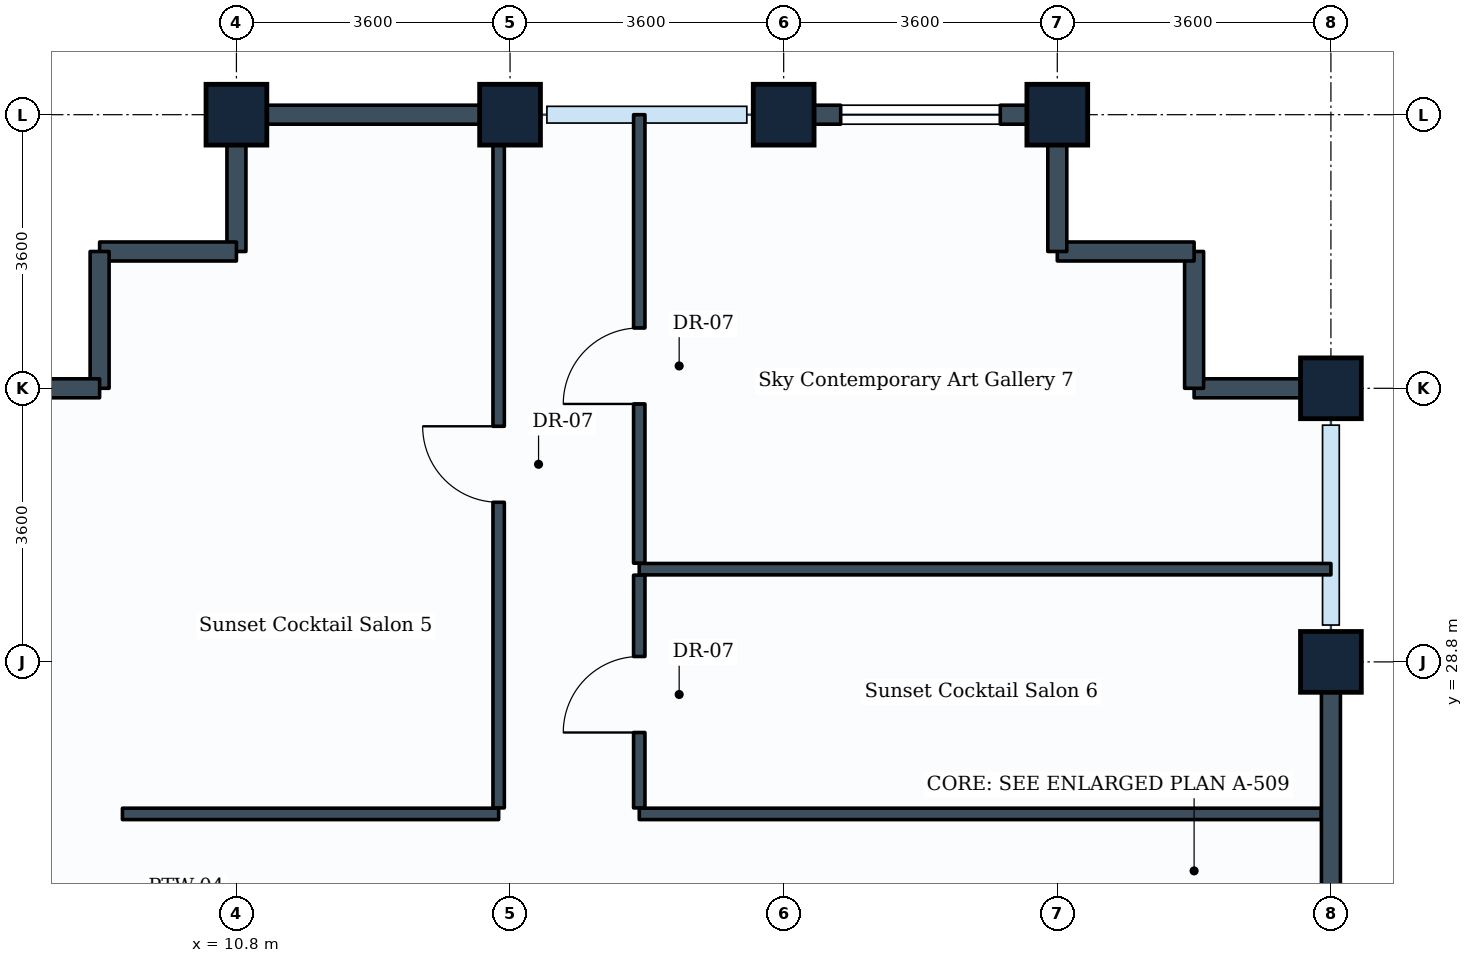
"""IFC4 building model, lengths in metres.
Left out: names, types, materials, properties, quantities, classifications, styles, units other than length and angle.
Written with IfcOpenShell. Run it as: python <this file> out.ifc"""

import sys

from ifc_helpers import new_model, si_unit, direction, frame, frame_2d, origin, origin_2d, place, context, subcontext, project, spatial, rectangle, extrude, element, fill, save


model = new_model("IFC4")
c1 = context("Model", 3, precision=1e-05, world=origin(), true_north=direction((0.0, 1.0)))
c2 = subcontext(c1, "Body", "Model", "MODEL_VIEW")
j1 = project(units=[si_unit("LENGTHUNIT", "METRE"), si_unit("PLANEANGLEUNIT", "RADIAN")], contexts=[c1])
p1 = place(None, origin())
s1 = spatial("IfcSite", under=j1, at=p1, CompositionType="ELEMENT")
p2 = place(p1, origin())
s2 = spatial("IfcBuilding", under=s1, at=p2, CompositionType="ELEMENT")
p3 = place(p2, frame((0.0, 0.0, 291.8)))
s3 = spatial("IfcBuildingStorey", under=s2, at=p3, CompositionType="ELEMENT", Elevation=291.8)
for number, where, z_axis, x_axis in (
    (1, (10.8, 36.0, 0.0), (0.0, 0.0, 1.0), (1.0, 0.0, 0.0)),
    (2, (14.4, 36.0, 0.0), (0.0, 0.0, 1.0), (1.0, 0.0, 0.0)),
    (3, (18.0, 36.0, 0.0), (0.0, 0.0, 1.0), (1.0, 0.0, 0.0)),
    (4, (21.6, 36.0, 0.0), (0.0, 0.0, 1.0), (1.0, 0.0, 0.0)),
    (5, (25.2, 28.8, 0.0), (0.0, 0.0, 1.0), (0.0, 1.0, 0.0)),
    (6, (25.2, 32.4, 0.0), (0.0, 0.0, 1.0), (0.0, 1.0, 0.0)),
):
    element("IfcColumn", number, at=place(p3, frame(where, z_axis=z_axis, x_axis=x_axis)), inside=s3, PredefinedType="COLUMN", context=c2, shape_type="SweptSolid", body=[
        extrude(rectangle(XDim=0.8, YDim=0.8, at=origin_2d()), origin(), (0.0, 0.0, 1.0), 3.6),
    ])
p4 = place(p3, frame((25.2, 28.8, 0.0), z_axis=(0.0, 0.0, 1.0), x_axis=(0.0, -1.0, 0.0)))
e7 = element("IfcWall", 7, at=p4, inside=s3, PredefinedType="STANDARD", context=c2, shape_type="SweptSolid", body=[
    extrude(rectangle(XDim=3.6, YDim=0.25, at=frame_2d((1.8, 0.0))), origin(), (0.0, 0.0, 1.0), 2.83),
])
p5 = place(p3, frame((23.4, 32.4, 0.0), z_axis=(0.0, 0.0, 1.0), x_axis=(1.0, 0.0, 0.0)))
e8 = element("IfcWall", 8, at=p5, inside=s3, PredefinedType="STANDARD", context=c2, shape_type="SweptSolid", body=[
    extrude(rectangle(XDim=1.8, YDim=0.25, at=frame_2d((0.9, 0.0))), origin(), (0.0, 0.0, 1.0), 2.83),
])
p6 = place(p3, frame((23.4, 32.4, 0.0), z_axis=(0.0, 0.0, 1.0), x_axis=(0.0, 1.0, 0.0)))
e9 = element("IfcWall", 9, at=p6, inside=s3, PredefinedType="STANDARD", context=c2, shape_type="SweptSolid", body=[
    extrude(rectangle(XDim=1.8, YDim=0.25, at=frame_2d((0.9, 0.0))), origin(), (0.0, 0.0, 1.0), 3.335),
])
p7 = place(p3, frame((21.6, 34.2, 0.0), z_axis=(0.0, 0.0, 1.0), x_axis=(1.0, 0.0, 0.0)))
e10 = element("IfcWall", 10, at=p7, inside=s3, PredefinedType="STANDARD", context=c2, shape_type="SweptSolid", body=[
    extrude(rectangle(XDim=1.8, YDim=0.25, at=frame_2d((0.9, 0.0))), origin(), (0.0, 0.0, 1.0), 3.335),
])
p8 = place(p3, frame((21.6, 34.2, 0.0), z_axis=(0.0, 0.0, 1.0), x_axis=(0.0, 1.0, 0.0)))
e11 = element("IfcWall", 11, at=p8, inside=s3, PredefinedType="STANDARD", context=c2, shape_type="SweptSolid", body=[
    extrude(rectangle(XDim=1.8, YDim=0.25, at=frame_2d((0.9, 0.0))), origin(), (0.0, 0.0, 1.0), 2.83),
])
p9 = place(p3, frame((18.0, 36.0, 0.0), z_axis=(0.0, 0.0, 1.0), x_axis=(1.0, 0.0, 0.0)))
e12 = element("IfcWall", 12, at=p9, inside=s3, PredefinedType="STANDARD", context=c2, shape_type="SweptSolid", body=[
    extrude(rectangle(XDim=3.6, YDim=0.25, at=frame_2d((1.8, 0.0))), origin(), (0.0, 0.0, 1.0), 2.83),
])
p10 = place(p9, frame((0.75, 0.0, 0.85)))
e13 = element("IfcOpeningElement", 13, at=p10, cuts=e12, PredefinedType="OPENING", context=c2, shape_type="SweptSolid", body=[
    extrude(rectangle(XDim=2.1, YDim=1.35, at=frame_2d((1.05, 0.675))), frame((0.0, 0.135, 0.0), z_axis=(0.0, -1.0, 0.0), x_axis=(1.0, 0.0, 0.0)), (0.0, 0.0, 1.0), 0.27),
])
p11 = place(p3, frame((10.8, 36.0, 0.0), z_axis=(0.0, 0.0, 1.0), x_axis=(1.0, 0.0, 0.0)))
e14 = element("IfcWall", 14, at=p11, inside=s3, PredefinedType="STANDARD", context=c2, shape_type="SweptSolid", body=[
    extrude(rectangle(XDim=3.6, YDim=0.25, at=frame_2d((1.8, 0.0))), origin(), (0.0, 0.0, 1.0), 2.83),
])
p12 = place(p3, frame((10.8, 34.2, 0.0), z_axis=(0.0, 0.0, 1.0), x_axis=(0.0, 1.0, 0.0)))
e15 = element("IfcWall", 15, at=p12, inside=s3, PredefinedType="STANDARD", context=c2, shape_type="SweptSolid", body=[
    extrude(rectangle(XDim=1.8, YDim=0.25, at=frame_2d((0.9, 0.0))), origin(), (0.0, 0.0, 1.0), 2.83),
])
for number, where, z_axis, x_axis in (
    (16, (9.0, 34.2, 0.0), (0.0, 0.0, 1.0), (1.0, 0.0, 0.0)),
    (17, (9.0, 32.4, 0.0), (0.0, 0.0, 1.0), (0.0, 1.0, 0.0)),
):
    element("IfcWall", number, at=place(p3, frame(where, z_axis=z_axis, x_axis=x_axis)), inside=s3, PredefinedType="STANDARD", context=c2, shape_type="SweptSolid", body=[
        extrude(rectangle(XDim=1.8, YDim=0.25, at=frame_2d((0.9, 0.0))), origin(), (0.0, 0.0, 1.0), 3.335),
    ])
p13 = place(p3, frame((7.2, 32.4, 0.0), z_axis=(0.0, 0.0, 1.0), x_axis=(1.0, 0.0, 0.0)))
e18 = element("IfcWall", 18, at=p13, inside=s3, PredefinedType="STANDARD", context=c2, shape_type="SweptSolid", body=[
    extrude(rectangle(XDim=1.8, YDim=0.25, at=frame_2d((0.9, 0.0))), origin(), (0.0, 0.0, 1.0), 2.83),
])
p14 = place(p3, frame((9.3, 26.8, 0.0), z_axis=(0.0, 0.0, 1.0), x_axis=(1.0, 0.0, 0.0)))
e19 = element("IfcWall", 19, at=p14, inside=s3, PredefinedType="PARTITIONING", context=c2, shape_type="SweptSolid", body=[
    extrude(rectangle(XDim=4.95, YDim=0.15, at=frame_2d((2.475, 0.0))), origin(), (0.0, 0.0, 1.0), 3.335),
])
p15 = place(p3, frame((14.25, 26.879, 0.0), z_axis=(0.0, 0.0, 1.0), x_axis=(0.0, 1.0, 0.0)))
e20 = element("IfcWall", 20, at=p15, inside=s3, PredefinedType="PARTITIONING", context=c2, shape_type="SweptSolid", body=[
    extrude(rectangle(XDim=8.992, YDim=0.15, at=frame_2d((4.496, 0.0))), origin(), (0.0, 0.0, 1.0), 2.83),
])
p16 = place(p15, frame((4.021, 0.0, 0.0)))
e21 = element("IfcOpeningElement", 21, at=p16, cuts=e20, PredefinedType="OPENING", context=c2, shape_type="SweptSolid", body=[
    extrude(rectangle(XDim=1.0, YDim=2.1, at=frame_2d((0.5, 1.05))), frame((0.0, 0.085, 0.0), z_axis=(0.0, -1.0, 0.0), x_axis=(1.0, 0.0, 0.0)), (0.0, 0.0, 1.0), 0.17),
])
p17 = place(p3, frame((16.1, 26.8, 0.0), z_axis=(0.0, 0.0, 1.0), x_axis=(1.0, 0.0, 0.0)))
e22 = element("IfcWall", 22, at=p17, inside=s3, PredefinedType="PARTITIONING", context=c2, shape_type="SweptSolid", body=[
    extrude(rectangle(XDim=8.971, YDim=0.15, at=frame_2d((4.485, 0.0))), origin(), (0.0, 0.0, 1.0), 2.83),
])
p18 = place(p3, frame((16.1, 30.02, 0.0), z_axis=(0.0, 0.0, 1.0), x_axis=(1.0, 0.0, 0.0)))
e23 = element("IfcWall", 23, at=p18, inside=s3, PredefinedType="PARTITIONING", context=c2, shape_type="SweptSolid", body=[
    extrude(rectangle(XDim=9.1, YDim=0.15, at=frame_2d((4.55, 0.0))), origin(), (0.0, 0.0, 1.0), 2.83),
])
p19 = place(p3, frame((16.1, 26.879, 0.0), z_axis=(0.0, 0.0, 1.0), x_axis=(0.0, 1.0, 0.0)))
e24 = element("IfcWall", 24, at=p19, inside=s3, PredefinedType="PARTITIONING", context=c2, shape_type="SweptSolid", body=[
    extrude(rectangle(XDim=3.062, YDim=0.15, at=frame_2d((1.531, 0.0))), origin(), (0.0, 0.0, 1.0), 3.03),
])
p20 = place(p19, frame((0.992, 0.0, 0.0)))
e25 = element("IfcOpeningElement", 25, at=p20, cuts=e24, PredefinedType="OPENING", context=c2, shape_type="SweptSolid", body=[
    extrude(rectangle(XDim=1.0, YDim=2.1, at=frame_2d((0.5, 1.05))), frame((0.0, 0.085, 0.0), z_axis=(0.0, -1.0, 0.0), x_axis=(1.0, 0.0, 0.0)), (0.0, 0.0, 1.0), 0.17),
])
p21 = place(p3, frame((16.1, 30.099, 0.0), z_axis=(0.0, 0.0, 1.0), x_axis=(0.0, 1.0, 0.0)))
e26 = element("IfcWall", 26, at=p21, inside=s3, PredefinedType="PARTITIONING", context=c2, shape_type="SweptSolid", body=[
    extrude(rectangle(XDim=5.901, YDim=0.15, at=frame_2d((2.95, 0.0))), origin(), (0.0, 0.0, 1.0), 2.83),
])
p22 = place(p21, frame((2.095, 0.0, 0.0)))
e27 = element("IfcOpeningElement", 27, at=p22, cuts=e26, PredefinedType="OPENING", context=c2, shape_type="SweptSolid", body=[
    extrude(rectangle(XDim=1.0, YDim=2.1, at=frame_2d((0.5, 1.05))), frame((0.0, 0.085, 0.0), z_axis=(0.0, -1.0, 0.0), x_axis=(1.0, 0.0, 0.0)), (0.0, 0.0, 1.0), 0.17),
])
p23 = place(p10, origin())
e28 = element("IfcWindow", 28, at=p23, inside=s3, PartitioningType="SINGLE_PANEL", PredefinedType="WINDOW", context=c2, shape_type="SweptSolid", body=[
    extrude(rectangle(XDim=2.1, YDim=1.35, at=frame_2d((1.05, 0.675))), frame((0.0, 0.03, 0.0), z_axis=(0.0, -1.0, 0.0), x_axis=(1.0, 0.0, 0.0)), (0.0, 0.0, 1.0), 0.06),
])
fill(e13, e28)
p24 = place(p16, origin())
e29 = element("IfcDoor", 29, at=p24, inside=s3, OperationType="SINGLE_SWING_RIGHT", PredefinedType="DOOR", context=c2, shape_type="SweptSolid", body=[
    extrude(rectangle(XDim=1.0, YDim=2.1, at=frame_2d((0.5, 1.05))), frame((0.0, 0.025, 0.0), z_axis=(0.0, -1.0, 0.0), x_axis=(1.0, 0.0, 0.0)), (0.0, 0.0, 1.0), 0.05),
])
fill(e21, e29)
p25 = place(p20, origin())
e30 = element("IfcDoor", 30, at=p25, inside=s3, OperationType="SINGLE_SWING_LEFT", PredefinedType="DOOR", context=c2, shape_type="SweptSolid", body=[
    extrude(rectangle(XDim=1.0, YDim=2.1, at=frame_2d((0.5, 1.05))), frame((0.0, 0.025, 0.0), z_axis=(0.0, -1.0, 0.0), x_axis=(1.0, 0.0, 0.0)), (0.0, 0.0, 1.0), 0.05),
])
fill(e25, e30)
p26 = place(p22, origin())
e31 = element("IfcDoor", 31, at=p26, inside=s3, OperationType="SINGLE_SWING_LEFT", PredefinedType="DOOR", context=c2, shape_type="SweptSolid", body=[
    extrude(rectangle(XDim=1.0, YDim=2.1, at=frame_2d((0.5, 1.05))), frame((0.0, 0.025, 0.0), z_axis=(0.0, -1.0, 0.0), x_axis=(1.0, 0.0, 0.0)), (0.0, 0.0, 1.0), 0.05),
])
fill(e27, e31)
save(model, sys.argv[1])
